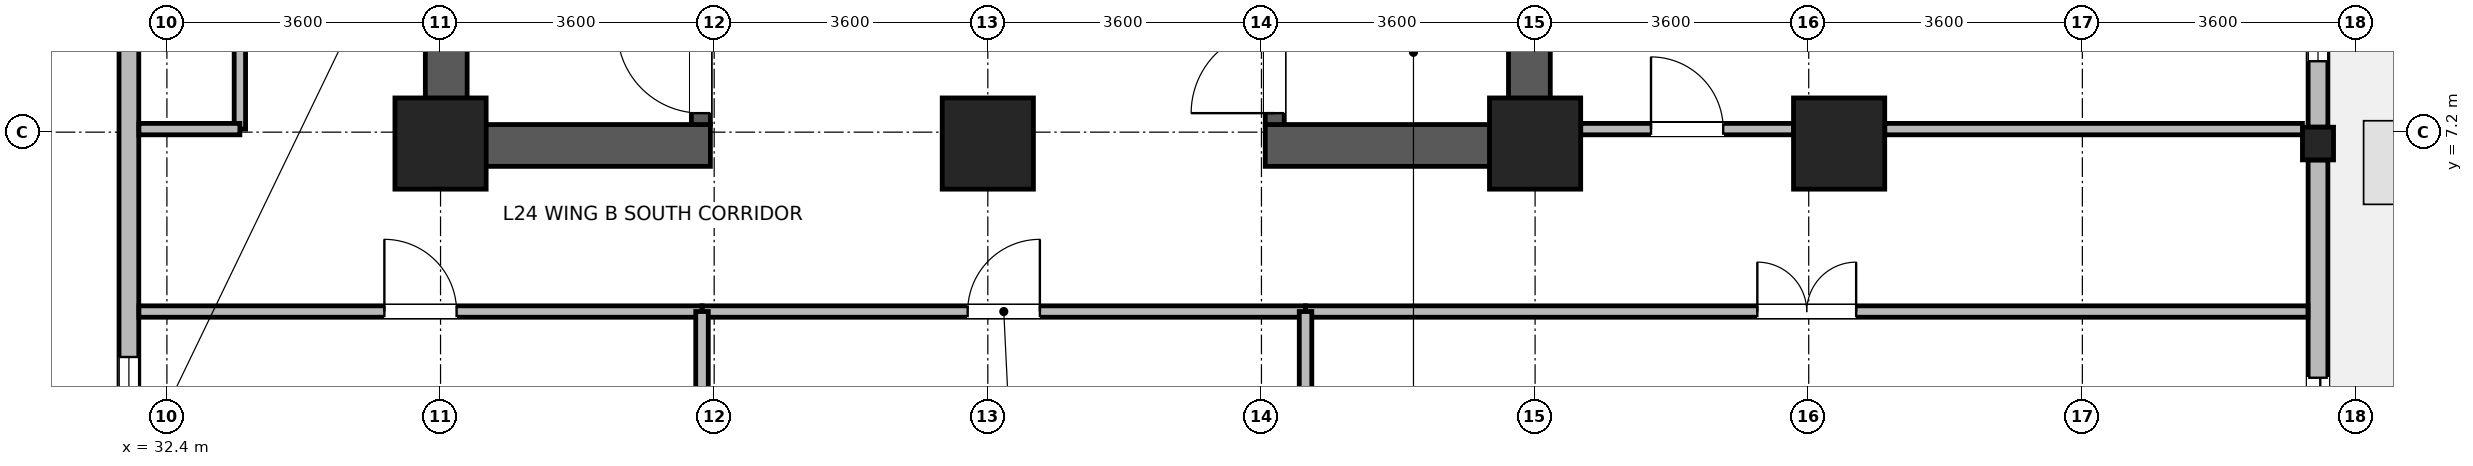
"""IFC4 building model, lengths in metres.
Left out: names, types, materials, properties, quantities, classifications, styles, units other than length and angle.
Written with IfcOpenShell. Run it as: python <this file> out.ifc"""

import sys

from ifc_helpers import new_model, si_unit, direction, frame, frame_2d, origin, origin_2d, place, context, subcontext, project, spatial, rectangle, i_section, extrude, source, transform, mapped, element, fill, save


model = new_model("IFC4")
c1 = context("Model", 3, precision=1e-05, world=origin(), true_north=direction((0.0, 1.0)))
c2 = subcontext(c1, "Body", "Model", "MODEL_VIEW")
j1 = project(units=[si_unit("LENGTHUNIT", "METRE"), si_unit("PLANEANGLEUNIT", "RADIAN")], contexts=[c1])
p1 = place(None, origin())
s1 = spatial("IfcSite", under=j1, at=p1, CompositionType="ELEMENT")
p2 = place(p1, origin())
s2 = spatial("IfcBuilding", under=s1, at=p2, CompositionType="ELEMENT")
p3 = place(p2, frame((0.0, 0.0, 97.1)))
s3 = spatial("IfcBuildingStorey", under=s2, at=p3, CompositionType="ELEMENT", Elevation=97.1)
for number, where, z_axis, x_axis in (
    (1, (36.075, 6.75, 0.0), (0.0, 0.0, 1.0), (0.0, 1.0, 0.0)),
    (2, (50.325, 6.75, 0.0), (0.0, 0.0, 1.0), (0.0, 1.0, 0.0)),
):
    element("IfcWall", number, at=place(p3, frame(where, z_axis=z_axis, x_axis=x_axis)), inside=s3, PredefinedType="SHEAR", context=c2, shape_type="SweptSolid", body=[
        extrude(rectangle(XDim=8.1, YDim=0.55, at=frame_2d((4.05, 0.0))), origin(), (0.0, 0.0, 1.0), 3.45),
    ])
for number, where, z_axis, x_axis in (
    (3, (36.35, 7.025, 0.0), (0.0, 0.0, 1.0), (1.0, 0.0, 0.0)),
    (4, (46.85, 7.025, 0.0), (0.0, 0.0, 1.0), (1.0, 0.0, 0.0)),
):
    element("IfcWall", number, at=place(p3, frame(where, z_axis=z_axis, x_axis=x_axis)), inside=s3, PredefinedType="SHEAR", context=c2, shape_type="SweptSolid", body=[
        extrude(rectangle(XDim=3.2, YDim=0.55, at=frame_2d((1.6, 0.0))), origin(), (0.0, 0.0, 1.0), 3.45),
    ])
p4 = place(p3, frame((39.425, 7.3, 0.0), z_axis=(0.0, 0.0, 1.0), x_axis=(0.0, 1.0, 0.0)))
e5 = element("IfcWall", 5, at=p4, inside=s3, PredefinedType="SHEAR", context=c2, shape_type="SweptSolid", body=[
    extrude(rectangle(XDim=7.0, YDim=0.25, at=frame_2d((3.5, 0.0))), origin(), (0.0, 0.0, 1.0), 3.45),
])
p5 = place(p4, frame((0.15, 0.0, 0.0)))
e6 = element("IfcOpeningElement", 6, at=p5, cuts=e5, PredefinedType="OPENING", context=c2, shape_type="SweptSolid", body=[
    extrude(rectangle(XDim=1.1, YDim=2.08, at=frame_2d((0.55, 1.04))), frame((0.0, 0.135, 0.0), z_axis=(0.0, -1.0, 0.0), x_axis=(1.0, 0.0, 0.0)), (0.0, 0.0, 1.0), 0.27),
])
p6 = place(p3, frame((46.975, 7.3, 0.0), z_axis=(0.0, 0.0, 1.0), x_axis=(0.0, 1.0, 0.0)))
e7 = element("IfcWall", 7, at=p6, inside=s3, PredefinedType="SHEAR", context=c2, shape_type="SweptSolid", body=[
    extrude(rectangle(XDim=7.0, YDim=0.25, at=frame_2d((3.5, 0.0))), origin(), (0.0, 0.0, 1.0), 3.45),
])
p7 = place(p6, frame((0.15, 0.0, 0.0)))
e8 = element("IfcOpeningElement", 8, at=p7, cuts=e7, PredefinedType="OPENING", context=c2, shape_type="SweptSolid", body=[
    extrude(rectangle(XDim=1.1, YDim=2.08, at=frame_2d((0.55, 1.04))), frame((0.0, 0.135, 0.0), z_axis=(0.0, -1.0, 0.0), x_axis=(1.0, 0.0, 0.0)), (0.0, 0.0, 1.0), 0.27),
])
m1 = source(origin(), c2, "Body", "SweptSolid", [
    extrude(rectangle(XDim=1.2, YDim=1.2, at=origin_2d()), origin(), (0.0, 0.0, 1.0), 3.7),
])
for number, where, z_axis, x_axis in (
    (9, (36.0, 7.05, 0.0), (0.0, 0.0, 1.0), (1.0, 0.0, 0.0)),
    (10, (43.2, 7.05, 0.0), (0.0, 0.0, 1.0), (1.0, 0.0, 0.0)),
    (11, (50.4, 7.05, 0.0), (0.0, 0.0, 1.0), (1.0, 0.0, 0.0)),
    (12, (54.4, 7.05, 0.0), (0.0, 0.0, 1.0), (1.0, 0.0, 0.0)),
):
    element("IfcColumn", number, at=place(p3, frame(where, z_axis=z_axis, x_axis=x_axis)), inside=s3, PredefinedType="COLUMN", context=c2, shape_type="MappedRepresentation", body=[
        mapped(m1, transform((0.0, 0.0, 0.0), x_axis=(1.0, 0.0, 0.0), y_axis=(0.0, 1.0, 0.0), z_axis=(0.0, 0.0, 1.0), scale=1.0)),
    ])
m2 = source(origin(), c2, "Body", "SweptSolid", [
    extrude(i_section(OverallWidth=0.409, OverallDepth=0.43, WebThickness=0.024, FlangeThickness=0.033, FilletRadius=0.015, at=origin_2d()), origin(), (0.0, 0.0, 1.0), 3.7),
])
p8 = place(p3, frame((60.7, 7.05, 0.0), z_axis=(0.0, 0.0, 1.0), x_axis=(1.0, 0.0, 0.0)))
e13 = element("IfcColumn", 13, at=p8, inside=s3, PredefinedType="COLUMN", context=c2, shape_type="MappedRepresentation", body=[
    mapped(m2, transform((0.0, 0.0, 0.0), x_axis=(1.0, 0.0, 0.0), y_axis=(0.0, 1.0, 0.0), z_axis=(0.0, 0.0, 1.0), scale=1.0)),
])
p9 = place(p3, frame((60.7, 6.834, 0.0), z_axis=(0.0, 0.0, 1.0), x_axis=(0.0, -1.0, 0.0)))
e14 = element("IfcWall", 14, at=p9, inside=s3, PredefinedType="STANDARD", context=c2, shape_type="SweptSolid", body=[
    extrude(rectangle(XDim=5.164, YDim=0.26, at=frame_2d((2.582, 0.0))), origin(), (0.0, 0.0, 1.0), 3.43),
])
p10 = place(p9, frame((2.865, 0.0, 0.0)))
e15 = element("IfcOpeningElement", 15, at=p10, cuts=e14, PredefinedType="OPENING", context=c2, shape_type="SweptSolid", body=[
    extrude(rectangle(XDim=1.5, YDim=2.15, at=frame_2d((0.75, 1.075))), frame((0.0, 0.14, 0.0), z_axis=(0.0, -1.0, 0.0), x_axis=(1.0, 0.0, 0.0)), (0.0, 0.0, 1.0), 0.28),
])
p11 = place(p3, frame((60.7, 14.334, 0.0), z_axis=(0.0, 0.0, 1.0), x_axis=(0.0, -1.0, 0.0)))
e16 = element("IfcWall", 16, at=p11, inside=s3, PredefinedType="STANDARD", context=c2, shape_type="SweptSolid", body=[
    extrude(rectangle(XDim=7.068, YDim=0.26, at=frame_2d((3.534, 0.0))), origin(), (0.0, 0.0, 1.0), 2.98),
])
p12 = place(p11, frame((0.867, 0.0, 0.85)))
e17 = element("IfcOpeningElement", 17, at=p12, cuts=e16, PredefinedType="OPENING", context=c2, shape_type="SweptSolid", body=[
    extrude(rectangle(XDim=1.8, YDim=1.85, at=frame_2d((0.9, 0.925))), frame((0.0, 0.14, 0.0), z_axis=(0.0, -1.0, 0.0), x_axis=(1.0, 0.0, 0.0)), (0.0, 0.0, 1.0), 0.28),
])
p13 = place(p11, frame((4.401, 0.0, 0.85)))
e18 = element("IfcOpeningElement", 18, at=p13, cuts=e16, PredefinedType="OPENING", context=c2, shape_type="SweptSolid", body=[
    extrude(rectangle(XDim=1.8, YDim=1.85, at=frame_2d((0.9, 0.925))), frame((0.0, 0.14, 0.0), z_axis=(0.0, -1.0, 0.0), x_axis=(1.0, 0.0, 0.0)), (0.0, 0.0, 1.0), 0.28),
])
p14 = place(p3, frame((31.9, 1.67, 0.0), z_axis=(0.0, 0.0, 1.0), x_axis=(0.0, 1.0, 0.0)))
e19 = element("IfcWall", 19, at=p14, inside=s3, PredefinedType="STANDARD", context=c2, shape_type="SweptSolid", body=[
    extrude(rectangle(XDim=20.06, YDim=0.26, at=frame_2d((10.03, 0.0))), origin(), (0.0, 0.0, 1.0), 3.43),
])
p15 = place(p14, frame((0.772, 0.0, 0.85)))
e20 = element("IfcOpeningElement", 20, at=p15, cuts=e19, PredefinedType="OPENING", context=c2, shape_type="SweptSolid", body=[
    extrude(rectangle(XDim=1.8, YDim=1.85, at=frame_2d((0.9, 0.925))), frame((0.0, 0.14, 0.0), z_axis=(0.0, -1.0, 0.0), x_axis=(1.0, 0.0, 0.0)), (0.0, 0.0, 1.0), 0.28),
])
p16 = place(p14, frame((7.458, 0.0, 0.85)))
e21 = element("IfcOpeningElement", 21, at=p16, cuts=e19, PredefinedType="OPENING", context=c2, shape_type="SweptSolid", body=[
    extrude(rectangle(XDim=1.8, YDim=1.85, at=frame_2d((0.9, 0.925))), frame((0.0, 0.14, 0.0), z_axis=(0.0, -1.0, 0.0), x_axis=(1.0, 0.0, 0.0)), (0.0, 0.0, 1.0), 0.28),
])
p17 = place(p14, frame((14.145, 0.0, 0.85)))
e22 = element("IfcOpeningElement", 22, at=p17, cuts=e19, PredefinedType="OPENING", context=c2, shape_type="SweptSolid", body=[
    extrude(rectangle(XDim=1.8, YDim=1.85, at=frame_2d((0.9, 0.925))), frame((0.0, 0.14, 0.0), z_axis=(0.0, -1.0, 0.0), x_axis=(1.0, 0.0, 0.0)), (0.0, 0.0, 1.0), 0.28),
])
p18 = place(p14, frame((17.488, 0.0, 0.85)))
e23 = element("IfcOpeningElement", 23, at=p18, cuts=e19, PredefinedType="OPENING", context=c2, shape_type="SweptSolid", body=[
    extrude(rectangle(XDim=1.8, YDim=1.85, at=frame_2d((0.9, 0.925))), frame((0.0, 0.14, 0.0), z_axis=(0.0, -1.0, 0.0), x_axis=(1.0, 0.0, 0.0)), (0.0, 0.0, 1.0), 0.28),
])
p19 = place(p3, frame((47.38, 4.84, 0.0), z_axis=(0.0, 0.0, 1.0), x_axis=(1.0, 0.0, 0.0)))
e24 = element("IfcWall", 24, at=p19, inside=s3, PredefinedType="PARTITIONING", context=c2, shape_type="SweptSolid", body=[
    extrude(rectangle(XDim=13.188, YDim=0.15, at=frame_2d((6.594, 0.0))), origin(), (0.0, 0.0, 1.0), 3.43),
])
p20 = place(p19, frame((5.944, 0.0, 0.0)))
e25 = element("IfcOpeningElement", 25, at=p20, cuts=e24, PredefinedType="OPENING", context=c2, shape_type="SweptSolid", body=[
    extrude(rectangle(XDim=1.3, YDim=2.12, at=frame_2d((0.65, 1.06))), frame((0.0, 0.085, 0.0), z_axis=(0.0, -1.0, 0.0), x_axis=(1.0, 0.0, 0.0)), (0.0, 0.0, 1.0), 0.17),
])
p21 = place(p3, frame((51.0, 7.24, 0.0), z_axis=(0.0, 0.0, 1.0), x_axis=(1.0, 0.0, 0.0)))
e26 = element("IfcWall", 26, at=p21, inside=s3, PredefinedType="PARTITIONING", context=c2, shape_type="SweptSolid", body=[
    extrude(rectangle(XDim=2.8, YDim=0.15, at=frame_2d((1.4, 0.0))), origin(), (0.0, 0.0, 1.0), 2.78),
])
p22 = place(p21, frame((0.925, 0.0, 0.0)))
e27 = element("IfcOpeningElement", 27, at=p22, cuts=e26, PredefinedType="OPENING", context=c2, shape_type="SweptSolid", body=[
    extrude(rectangle(XDim=0.95, YDim=2.1, at=frame_2d((0.475, 1.05))), frame((0.0, 0.085, 0.0), z_axis=(0.0, -1.0, 0.0), x_axis=(1.0, 0.0, 0.0)), (0.0, 0.0, 1.0), 0.17),
])
p23 = place(p3, frame((55.0, 7.24, 0.0), z_axis=(0.0, 0.0, 1.0), x_axis=(1.0, 0.0, 0.0)))
e28 = element("IfcWall", 28, at=p23, inside=s3, PredefinedType="PARTITIONING", context=c2, shape_type="SweptSolid", body=[
    extrude(rectangle(XDim=5.496, YDim=0.15, at=frame_2d((2.748, 0.0))), origin(), (0.0, 0.0, 1.0), 2.78),
])
p24 = place(p3, frame((39.44, 4.84, 0.0), z_axis=(0.0, 0.0, 1.0), x_axis=(1.0, 0.0, 0.0)))
e29 = element("IfcWall", 29, at=p24, inside=s3, PredefinedType="PARTITIONING", context=c2, shape_type="SweptSolid", body=[
    extrude(rectangle(XDim=7.94, YDim=0.15, at=frame_2d((3.97, 0.0))), origin(), (0.0, 0.0, 1.0), 3.43),
])
p25 = place(p24, frame((3.495, 0.0, 0.0)))
e30 = element("IfcOpeningElement", 30, at=p25, cuts=e29, PredefinedType="OPENING", context=c2, shape_type="SweptSolid", body=[
    extrude(rectangle(XDim=0.95, YDim=2.1, at=frame_2d((0.475, 1.05))), frame((0.0, 0.085, 0.0), z_axis=(0.0, -1.0, 0.0), x_axis=(1.0, 0.0, 0.0)), (0.0, 0.0, 1.0), 0.17),
])
p26 = place(p3, frame((32.032, 4.84, 0.0), z_axis=(0.0, 0.0, 1.0), x_axis=(1.0, 0.0, 0.0)))
e31 = element("IfcWall", 31, at=p26, inside=s3, PredefinedType="PARTITIONING", context=c2, shape_type="SweptSolid", body=[
    extrude(rectangle(XDim=7.408, YDim=0.15, at=frame_2d((3.704, 0.0))), origin(), (0.0, 0.0, 1.0), 3.43),
])
p27 = place(p26, frame((3.229, 0.0, 0.0)))
e32 = element("IfcOpeningElement", 32, at=p27, cuts=e31, PredefinedType="OPENING", context=c2, shape_type="SweptSolid", body=[
    extrude(rectangle(XDim=0.95, YDim=2.1, at=frame_2d((0.475, 1.05))), frame((0.0, 0.085, 0.0), z_axis=(0.0, -1.0, 0.0), x_axis=(1.0, 0.0, 0.0)), (0.0, 0.0, 1.0), 0.17),
])
p28 = place(p3, frame((33.36, 7.24, 0.0), z_axis=(0.0, 0.0, 1.0), x_axis=(0.0, 1.0, 0.0)))
e33 = element("IfcWall", 33, at=p28, inside=s3, PredefinedType="PARTITIONING", context=c2, shape_type="SweptSolid", body=[
    extrude(rectangle(XDim=7.26, YDim=0.15, at=frame_2d((3.63, 0.0))), origin(), (0.0, 0.0, 1.0), 3.43),
])
p29 = place(p28, frame((2.98, 0.0, 0.0)))
e34 = element("IfcOpeningElement", 34, at=p29, cuts=e33, PredefinedType="OPENING", context=c2, shape_type="SweptSolid", body=[
    extrude(rectangle(XDim=1.3, YDim=2.12, at=frame_2d((0.65, 1.06))), frame((0.0, 0.085, 0.0), z_axis=(0.0, -1.0, 0.0), x_axis=(1.0, 0.0, 0.0)), (0.0, 0.0, 1.0), 0.17),
])
p30 = place(p3, frame((32.032, 7.24, 0.0), z_axis=(0.0, 0.0, 1.0), x_axis=(1.0, 0.0, 0.0)))
e35 = element("IfcWall", 35, at=p30, inside=s3, PredefinedType="PARTITIONING", context=c2, shape_type="SweptSolid", body=[
    extrude(rectangle(XDim=1.328, YDim=0.15, at=frame_2d((0.664, 0.0))), origin(), (0.0, 0.0, 1.0), 3.43),
])
for number, where, z_axis, x_axis in (
    (36, (39.44, 1.932, 0.0), (0.0, 0.0, 1.0), (0.0, 1.0, 0.0)),
    (37, (47.38, 1.932, 0.0), (0.0, 0.0, 1.0), (0.0, 1.0, 0.0)),
):
    element("IfcWall", number, at=place(p3, frame(where, z_axis=z_axis, x_axis=x_axis)), inside=s3, PredefinedType="PARTITIONING", context=c2, shape_type="SweptSolid", body=[
        extrude(rectangle(XDim=2.908, YDim=0.165, at=frame_2d((1.454, 0.0))), origin(), (0.0, 0.0, 1.0), 3.43),
    ])
p31 = place(p10, origin())
e38 = element("IfcDoor", 38, at=p31, inside=s3, OperationType="SLIDING_TO_LEFT", PredefinedType="DOOR", context=c2, shape_type="SweptSolid", body=[
    extrude(rectangle(XDim=1.5, YDim=2.15, at=frame_2d((0.75, 1.075))), frame((0.0, 0.025, 0.0), z_axis=(0.0, -1.0, 0.0), x_axis=(1.0, 0.0, 0.0)), (0.0, 0.0, 1.0), 0.05),
])
fill(e15, e38)
p32 = place(p13, origin())
e39 = element("IfcWindow", 39, at=p32, inside=s3, PartitioningType="SINGLE_PANEL", PredefinedType="WINDOW", context=c2, shape_type="SweptSolid", body=[
    extrude(rectangle(XDim=1.8, YDim=1.85, at=frame_2d((0.9, 0.925))), frame((0.0, 0.03, 0.0), z_axis=(0.0, -1.0, 0.0), x_axis=(1.0, 0.0, 0.0)), (0.0, 0.0, 1.0), 0.06),
])
fill(e18, e39)
p33 = place(p15, origin())
e40 = element("IfcWindow", 40, at=p33, inside=s3, PartitioningType="SINGLE_PANEL", PredefinedType="WINDOW", context=c2, shape_type="SweptSolid", body=[
    extrude(rectangle(XDim=1.8, YDim=1.85, at=frame_2d((0.9, 0.925))), frame((0.0, 0.03, 0.0), z_axis=(0.0, -1.0, 0.0), x_axis=(1.0, 0.0, 0.0)), (0.0, 0.0, 1.0), 0.06),
])
fill(e20, e40)
p34 = place(p5, origin())
e41 = element("IfcDoor", 41, at=p34, inside=s3, OperationType="SINGLE_SWING_RIGHT", PredefinedType="DOOR", context=c2, shape_type="SweptSolid", body=[
    extrude(rectangle(XDim=1.1, YDim=2.08, at=frame_2d((0.55, 1.04))), frame((0.0, 0.025, 0.0), z_axis=(0.0, -1.0, 0.0), x_axis=(1.0, 0.0, 0.0)), (0.0, 0.0, 1.0), 0.05),
])
fill(e6, e41)
p35 = place(p7, origin())
e42 = element("IfcDoor", 42, at=p35, inside=s3, OperationType="SINGLE_SWING_LEFT", PredefinedType="DOOR", context=c2, shape_type="SweptSolid", body=[
    extrude(rectangle(XDim=1.1, YDim=2.08, at=frame_2d((0.55, 1.04))), frame((0.0, 0.025, 0.0), z_axis=(0.0, -1.0, 0.0), x_axis=(1.0, 0.0, 0.0)), (0.0, 0.0, 1.0), 0.05),
])
fill(e8, e42)
p36 = place(p20, origin())
e43 = element("IfcDoor", 43, at=p36, inside=s3, OperationType="DOUBLE_DOOR_SINGLE_SWING", PredefinedType="DOOR", context=c2, shape_type="SweptSolid", body=[
    extrude(rectangle(XDim=1.3, YDim=2.12, at=frame_2d((0.65, 1.06))), frame((0.0, 0.025, 0.0), z_axis=(0.0, -1.0, 0.0), x_axis=(1.0, 0.0, 0.0)), (0.0, 0.0, 1.0), 0.05),
])
fill(e25, e43)
p37 = place(p22, origin())
e44 = element("IfcDoor", 44, at=p37, inside=s3, OperationType="SINGLE_SWING_LEFT", PredefinedType="DOOR", context=c2, shape_type="SweptSolid", body=[
    extrude(rectangle(XDim=0.95, YDim=2.1, at=frame_2d((0.475, 1.05))), frame((0.0, 0.025, 0.0), z_axis=(0.0, -1.0, 0.0), x_axis=(1.0, 0.0, 0.0)), (0.0, 0.0, 1.0), 0.05),
])
fill(e27, e44)
p38 = place(p25, origin())
e45 = element("IfcDoor", 45, at=p38, inside=s3, OperationType="SINGLE_SWING_RIGHT", PredefinedType="DOOR", context=c2, shape_type="SweptSolid", body=[
    extrude(rectangle(XDim=0.95, YDim=2.1, at=frame_2d((0.475, 1.05))), frame((0.0, 0.025, 0.0), z_axis=(0.0, -1.0, 0.0), x_axis=(1.0, 0.0, 0.0)), (0.0, 0.0, 1.0), 0.05),
])
fill(e30, e45)
p39 = place(p27, origin())
e46 = element("IfcDoor", 46, at=p39, inside=s3, OperationType="SINGLE_SWING_LEFT", PredefinedType="DOOR", context=c2, shape_type="SweptSolid", body=[
    extrude(rectangle(XDim=0.95, YDim=2.1, at=frame_2d((0.475, 1.05))), frame((0.0, 0.025, 0.0), z_axis=(0.0, -1.0, 0.0), x_axis=(1.0, 0.0, 0.0)), (0.0, 0.0, 1.0), 0.05),
])
fill(e32, e46)
save(model, sys.argv[1])
